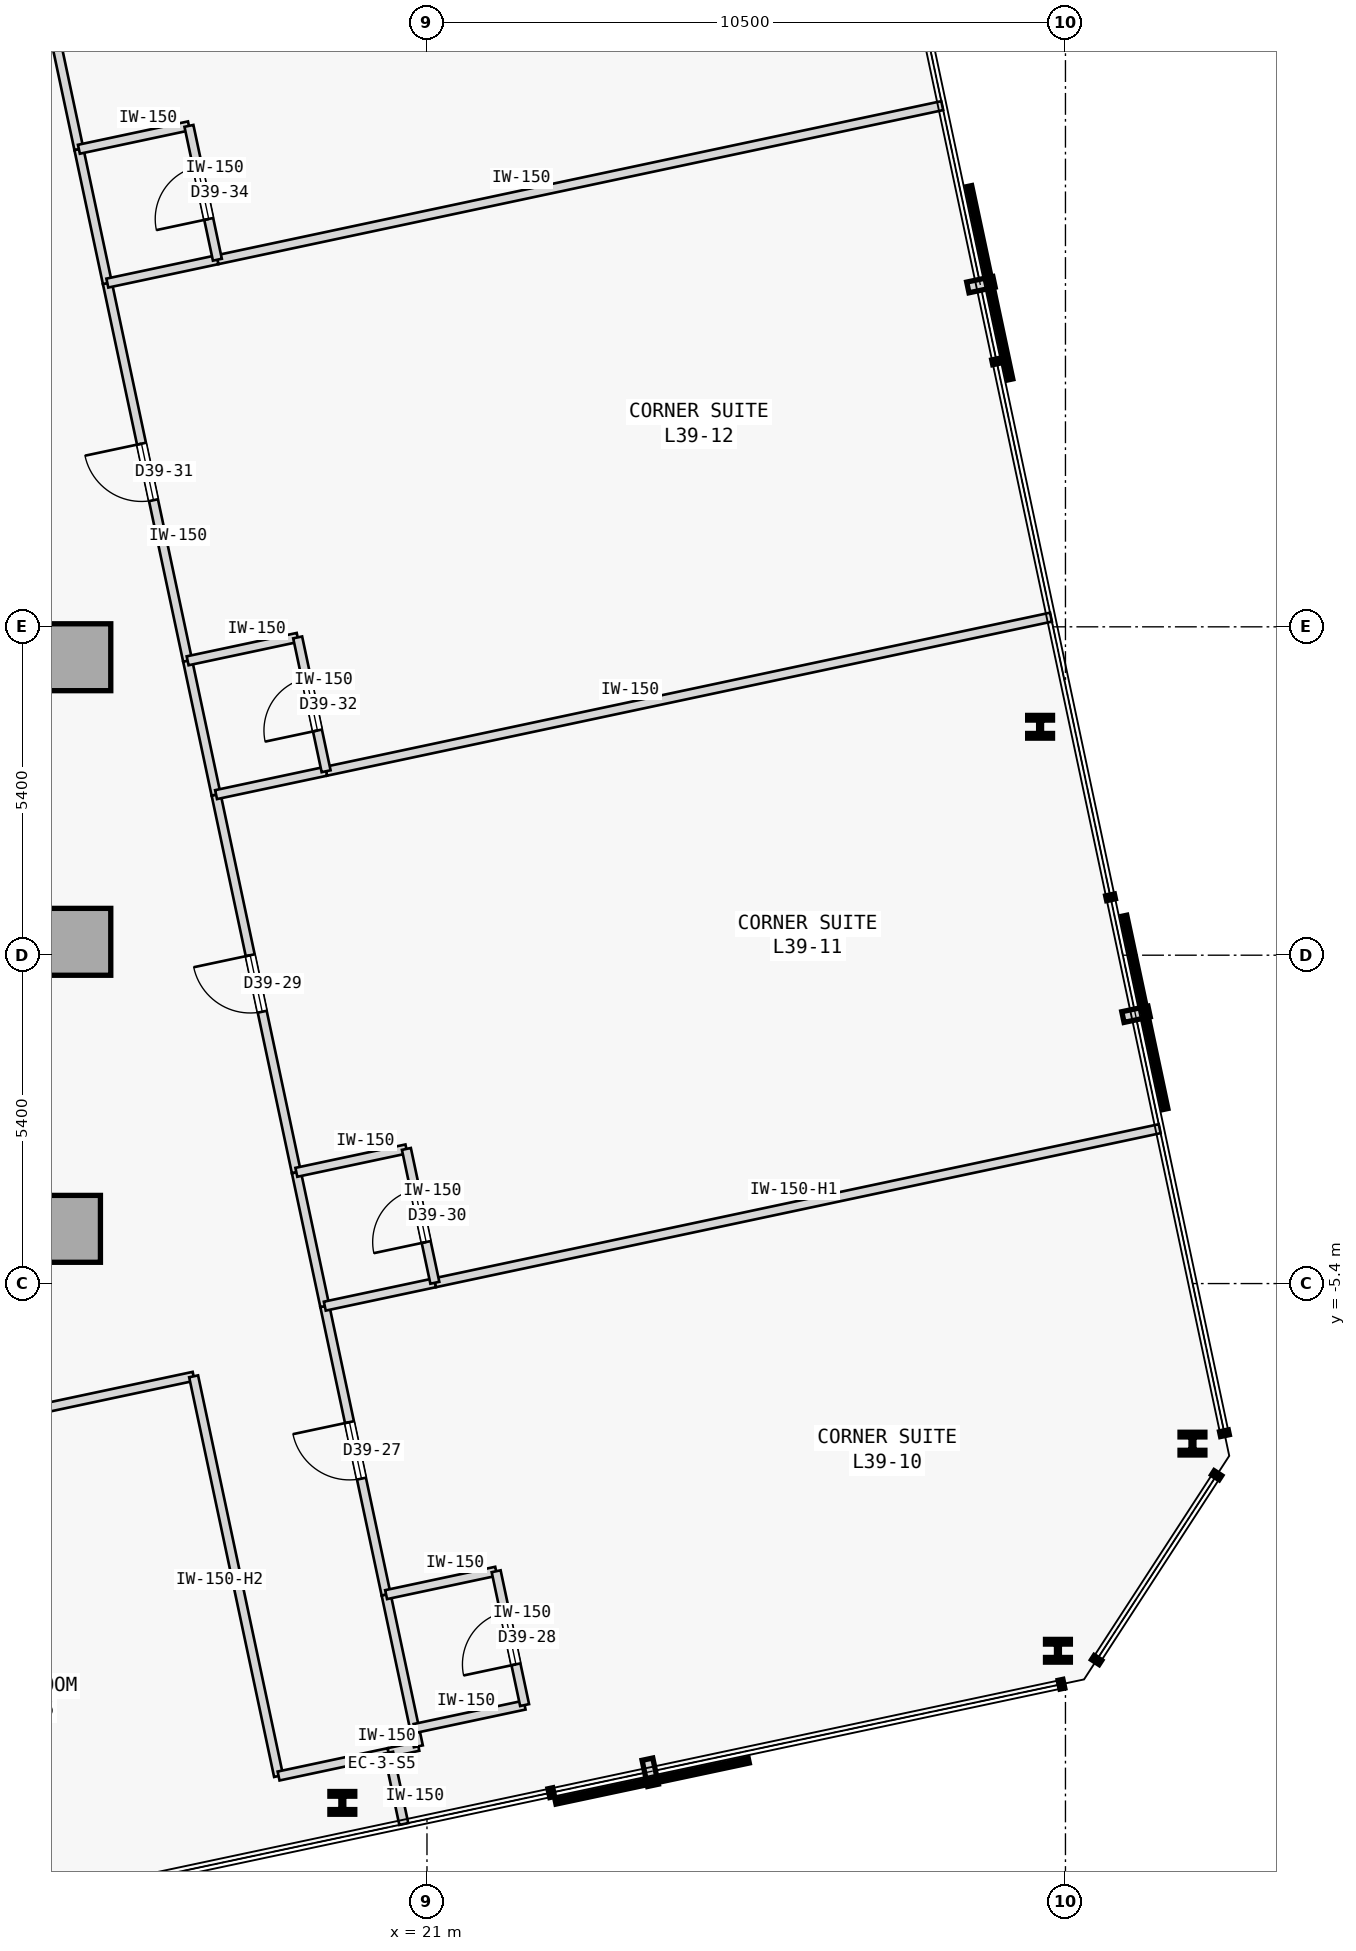
"""IFC4 building model, lengths in metres.
Left out: names, types, materials, properties, quantities, classifications, styles, units other than length and angle.
Written with IfcOpenShell. Run it as: python <this file> out.ifc"""

import sys

from ifc_helpers import new_model, si_unit, direction, frame, frame_2d, origin, origin_2d, place, context, subcontext, project, spatial, rectangle, i_section, extrude, element, fill, save


model = new_model("IFC4")
c1 = context("Model", 3, precision=1e-05, world=origin(), true_north=direction((0.0, 1.0)))
c2 = subcontext(c1, "Body", "Model", "MODEL_VIEW")
j1 = project(units=[si_unit("LENGTHUNIT", "METRE"), si_unit("PLANEANGLEUNIT", "RADIAN")], contexts=[c1])
p1 = place(None, origin())
s1 = spatial("IfcSite", under=j1, at=p1, CompositionType="ELEMENT")
p2 = place(p1, origin())
s2 = spatial("IfcBuilding", under=s1, at=p2, CompositionType="ELEMENT")
p3 = place(p2, frame((0.0, 0.0, 154.8)))
s3 = spatial("IfcBuildingStorey", under=s2, at=p3, CompositionType="ELEMENT", Elevation=154.8)
for number, where, z_axis, x_axis in (
    (1, (15.25, 4.9, 0.0), (0.0, 0.0, 1.0), (1.0, 0.0, 0.0)),
    (2, (15.25, 0.22, 0.0), (0.0, 0.0, 1.0), (1.0, 0.0, 0.0)),
    (3, (15.08, -4.5, 0.0), (0.0, 0.0, 1.0), (1.0, 0.0, 0.0)),
):
    element("IfcColumn", number, at=place(p3, frame(where, z_axis=z_axis, x_axis=x_axis)), inside=s3, PredefinedType="COLUMN", context=c2, shape_type="SweptSolid", body=[
        extrude(rectangle(XDim=1.1, YDim=1.1, at=origin_2d()), origin(), (0.0, 0.0, 1.0), 3.4),
    ])
for number, where, z_axis, x_axis in (
    (4, (19.608, -13.94, 0.0), (0.0, 0.0, 1.0), (1.0, 0.0, 0.0)),
    (5, (31.376, -11.439, 0.0), (0.0, 0.0, 1.0), (1.0, 0.0, 0.0)),
    (6, (33.589, -8.032, 0.0), (0.0, 0.0, 1.0), (1.0, 0.0, 0.0)),
    (7, (31.083, 3.756, 0.0), (0.0, 0.0, 1.0), (1.0, 0.0, 0.0)),
):
    element("IfcColumn", number, at=place(p3, frame(where, z_axis=z_axis, x_axis=x_axis)), inside=s3, PredefinedType="COLUMN", context=c2, shape_type="SweptSolid", body=[
        extrude(i_section(OverallWidth=0.409, OverallDepth=0.374, WebThickness=0.048, FlangeThickness=0.077, FilletRadius=0.015, at=origin_2d()), origin(), (0.0, 0.0, 1.0), 3.4),
    ])
p4 = place(p3, frame((10.309, -8.382, 0.0), z_axis=(0.0, 0.0, 1.0), x_axis=(0.978149817889, 0.207901259648, 0.0)))
e8 = element("IfcWall", 8, at=p4, inside=s3, PredefinedType="PARTITIONING", context=c2, shape_type="SweptSolid", body=[
    extrude(rectangle(XDim=7.007, YDim=0.15, at=frame_2d((3.503, 0.0))), origin(), (0.0, 0.0, 1.0), 3.175),
])
p5 = place(p4, frame((3.043, 0.0, 0.0)))
e9 = element("IfcOpeningElement", 9, at=p5, cuts=e8, PredefinedType="OPENING", context=c2, shape_type="SweptSolid", body=[
    extrude(rectangle(XDim=0.92, YDim=2.15, at=frame_2d((0.46, 1.075))), frame((0.0, 0.085, 0.0), z_axis=(0.0, -1.0, 0.0), x_axis=(1.0, 0.0, 0.0)), (0.0, 0.0, 1.0), 0.17),
])
p6 = place(p3, frame((18.56, -13.498, 0.0), z_axis=(0.0, 0.0, 1.0), x_axis=(-0.207888737749, 0.978152479278, 0.0)))
e10 = element("IfcWall", 10, at=p6, inside=s3, PredefinedType="PARTITIONING", context=c2, shape_type="SweptSolid", body=[
    extrude(rectangle(XDim=6.72, YDim=0.15, at=frame_2d((3.36, 0.0))), origin(), (0.0, 0.0, 1.0), 2.575),
])
p7 = place(p3, frame((18.56, -13.498, 0.0), z_axis=(0.0, 0.0, 1.0), x_axis=(0.978160192495, 0.207852442415, 0.0)))
e11 = element("IfcWall", 11, at=p7, inside=s3, PredefinedType="PARTITIONING", context=c2, shape_type="SweptSolid", body=[
    extrude(rectangle(XDim=1.85, YDim=0.15, at=frame_2d((0.925, 0.0))), origin(), (0.0, 0.0, 1.0), 3.175),
])
p8 = place(p3, frame((20.369, -13.114, 0.0), z_axis=(0.0, 0.0, 1.0), x_axis=(0.978143962546, 0.207928806409, 0.0)))
e12 = element("IfcWall", 12, at=p8, inside=s3, PredefinedType="PARTITIONING", context=c2, shape_type="SweptSolid", body=[
    extrude(rectangle(XDim=0.5, YDim=0.15, at=frame_2d((0.25, 0.0))), origin(), (0.0, 0.0, 1.0), 3.175),
])
p9 = place(p3, frame((20.858, -13.01, 0.0), z_axis=(0.0, 0.0, 1.0), x_axis=(-0.208306395052, 0.978063620518, 0.0)))
e13 = element("IfcWall", 13, at=p9, inside=s3, PredefinedType="PARTITIONING", context=c2, shape_type="SweptSolid", body=[
    extrude(rectangle(XDim=0.3, YDim=0.15, at=frame_2d((0.15, 0.0))), origin(), (0.0, 0.0, 1.0), 3.175),
])
p10 = place(p3, frame((20.328, -10.515, 0.0), z_axis=(0.0, 0.0, 1.0), x_axis=(-0.207950868925, 0.97813927235, 0.0)))
e14 = element("IfcWall", 14, at=p10, inside=s3, PredefinedType="PARTITIONING", context=c2, shape_type="SweptSolid", body=[
    extrude(rectangle(XDim=4.85, YDim=0.15, at=frame_2d((2.425, 0.0))), origin(), (0.0, 0.0, 1.0), 3.175),
])
p11 = place(p10, frame((1.95, 0.0, 0.0)))
e15 = element("IfcOpeningElement", 15, at=p11, cuts=e14, PredefinedType="OPENING", context=c2, shape_type="SweptSolid", body=[
    extrude(rectangle(XDim=0.95, YDim=2.15, at=frame_2d((0.475, 1.075))), frame((0.0, 0.085, 0.0), z_axis=(0.0, -1.0, 0.0), x_axis=(1.0, 0.0, 0.0)), (0.0, 0.0, 1.0), 0.17),
])
p12 = place(p3, frame((20.796, -12.716, 0.0), z_axis=(0.0, 0.0, 1.0), x_axis=(-0.207891197838, 0.978151956427, 0.0)))
e16 = element("IfcWall", 16, at=p12, inside=s3, PredefinedType="PARTITIONING", context=c2, shape_type="SweptSolid", body=[
    extrude(rectangle(XDim=2.25, YDim=0.15, at=frame_2d((1.125, 0.0))), origin(), (0.0, 0.0, 1.0), 3.175),
])
p13 = place(p3, frame((18.852, -3.571, 0.0), z_axis=(0.0, 0.0, 1.0), x_axis=(-0.207879907349, 0.978154355979, 0.0)))
e17 = element("IfcWall", 17, at=p13, inside=s3, PredefinedType="PARTITIONING", context=c2, shape_type="SweptSolid", body=[
    extrude(rectangle(XDim=6.35, YDim=0.15, at=frame_2d((3.175, 0.0))), origin(), (0.0, 0.0, 1.0), 3.175),
])
p14 = place(p13, frame((2.7, 0.0, 0.0)))
e18 = element("IfcOpeningElement", 18, at=p14, cuts=e17, PredefinedType="OPENING", context=c2, shape_type="SweptSolid", body=[
    extrude(rectangle(XDim=0.95, YDim=2.15, at=frame_2d((0.475, 1.075))), frame((0.0, 0.085, 0.0), z_axis=(0.0, -1.0, 0.0), x_axis=(1.0, 0.0, 0.0)), (0.0, 0.0, 1.0), 0.17),
])
p15 = place(p3, frame((19.32, -5.771, 0.0), z_axis=(0.0, 0.0, 1.0), x_axis=(-0.207913264065, 0.978147266328, 0.0)))
e19 = element("IfcWall", 19, at=p15, inside=s3, PredefinedType="PARTITIONING", context=c2, shape_type="SweptSolid", body=[
    extrude(rectangle(XDim=2.25, YDim=0.15, at=frame_2d((1.125, 0.0))), origin(), (0.0, 0.0, 1.0), 3.175),
])
p16 = place(p3, frame((17.064, 4.841, 0.0), z_axis=(0.0, 0.0, 1.0), x_axis=(-0.207924511115, 0.978144875608, 0.0)))
e20 = element("IfcWall", 20, at=p16, inside=s3, PredefinedType="PARTITIONING", context=c2, shape_type="SweptSolid", body=[
    extrude(rectangle(XDim=6.35, YDim=0.15, at=frame_2d((3.175, 0.0))), origin(), (0.0, 0.0, 1.0), 3.175),
])
p17 = place(p16, frame((2.7, 0.0, 0.0)))
e21 = element("IfcOpeningElement", 21, at=p17, cuts=e20, PredefinedType="OPENING", context=c2, shape_type="SweptSolid", body=[
    extrude(rectangle(XDim=0.95, YDim=2.15, at=frame_2d((0.475, 1.075))), frame((0.0, 0.085, 0.0), z_axis=(0.0, -1.0, 0.0), x_axis=(1.0, 0.0, 0.0)), (0.0, 0.0, 1.0), 0.17),
])
p18 = place(p3, frame((17.532, 2.641, 0.0), z_axis=(0.0, 0.0, 1.0), x_axis=(-0.207913264065, 0.978147266328, 0.0)))
e22 = element("IfcWall", 22, at=p18, inside=s3, PredefinedType="PARTITIONING", context=c2, shape_type="SweptSolid", body=[
    extrude(rectangle(XDim=2.25, YDim=0.15, at=frame_2d((1.125, 0.0))), origin(), (0.0, 0.0, 1.0), 3.175),
])
p19 = place(p3, frame((15.276, 13.253, 0.0), z_axis=(0.0, 0.0, 1.0), x_axis=(-0.207924511115, 0.978144875608, 0.0)))
e23 = element("IfcWall", 23, at=p19, inside=s3, PredefinedType="PARTITIONING", context=c2, shape_type="SweptSolid", body=[
    extrude(rectangle(XDim=6.35, YDim=0.15, at=frame_2d((3.175, 0.0))), origin(), (0.0, 0.0, 1.0), 3.175),
])
p20 = place(p19, frame((2.7, 0.0, 0.0)))
e24 = element("IfcOpeningElement", 24, at=p20, cuts=e23, PredefinedType="OPENING", context=c2, shape_type="SweptSolid", body=[
    extrude(rectangle(XDim=0.95, YDim=2.15, at=frame_2d((0.475, 1.075))), frame((0.0, 0.085, 0.0), z_axis=(0.0, -1.0, 0.0), x_axis=(1.0, 0.0, 0.0)), (0.0, 0.0, 1.0), 0.17),
])
p21 = place(p3, frame((15.744, 11.052, 0.0), z_axis=(0.0, 0.0, 1.0), x_axis=(-0.207891197838, 0.978151956427, 0.0)))
e25 = element("IfcWall", 25, at=p21, inside=s3, PredefinedType="PARTITIONING", context=c2, shape_type="SweptSolid", body=[
    extrude(rectangle(XDim=2.25, YDim=0.15, at=frame_2d((1.125, 0.0))), origin(), (0.0, 0.0, 1.0), 3.175),
])
p22 = place(p3, frame((20.619, -14.288, 0.0), z_axis=(0.0, 0.0, 1.0), x_axis=(-0.207917150959, 0.978146440129, 0.0)))
e26 = element("IfcWall", 26, at=p22, inside=s3, PredefinedType="PARTITIONING", context=c2, shape_type="SweptSolid", body=[
    extrude(rectangle(XDim=1.2, YDim=0.15, at=frame_2d((0.6, 0.0))), origin(), (0.0, 0.0, 1.0), 3.175),
])
for number, where, z_axis, x_axis in (
    (27, (20.796, -12.716, 0.0), (0.0, 0.0, 1.0), (0.978, 0.208, 0.0)),
    (28, (20.328, -10.515, 0.0), (0.0, 0.0, 1.0), (0.978, 0.208, 0.0)),
):
    element("IfcWall", number, at=place(p3, frame(where, z_axis=z_axis, x_axis=x_axis)), inside=s3, PredefinedType="PARTITIONING", context=c2, shape_type="SweptSolid", body=[
        extrude(rectangle(XDim=1.85, YDim=0.15, at=frame_2d((0.925, 0.0))), origin(), (0.0, 0.0, 1.0), 3.175),
    ])
p23 = place(p3, frame((22.605, -12.332, 0.0), z_axis=(0.0, 0.0, 1.0), x_axis=(-0.207891197838, 0.978151956427, 0.0)))
e29 = element("IfcWall", 29, at=p23, inside=s3, PredefinedType="PARTITIONING", context=c2, shape_type="SweptSolid", body=[
    extrude(rectangle(XDim=2.25, YDim=0.15, at=frame_2d((1.125, 0.0))), origin(), (0.0, 0.0, 1.0), 3.175),
])
p24 = place(p23, frame((0.685, 0.0, 0.0)))
e30 = element("IfcOpeningElement", 30, at=p24, cuts=e29, PredefinedType="OPENING", context=c2, shape_type="SweptSolid", body=[
    extrude(rectangle(XDim=0.88, YDim=2.15, at=frame_2d((0.44, 1.075))), frame((0.0, 0.085, 0.0), z_axis=(0.0, -1.0, 0.0), x_axis=(1.0, 0.0, 0.0)), (0.0, 0.0, 1.0), 0.17),
])
p25 = place(p3, frame((21.129, -5.387, 0.0), z_axis=(0.0, 0.0, 1.0), x_axis=(0.97814556055, 0.207921288896, 0.0)))
e31 = element("IfcWall", 31, at=p25, inside=s3, PredefinedType="PARTITIONING", context=c2, shape_type="SweptSolid", body=[
    extrude(rectangle(XDim=12.187, YDim=0.15, at=frame_2d((6.094, 0.0))), origin(), (0.0, 0.0, 1.0), 2.725),
])
p26 = place(p3, frame((19.32, -5.771, 0.0), z_axis=(0.0, 0.0, 1.0), x_axis=(0.978165892835, 0.207825614625, 0.0)))
e32 = element("IfcWall", 32, at=p26, inside=s3, PredefinedType="PARTITIONING", context=c2, shape_type="SweptSolid", body=[
    extrude(rectangle(XDim=1.85, YDim=0.15, at=frame_2d((0.925, 0.0))), origin(), (0.0, 0.0, 1.0), 3.175),
])
p27 = place(p3, frame((18.852, -3.571, 0.0), z_axis=(0.0, 0.0, 1.0), x_axis=(0.978139061018, 0.207951862966, 0.0)))
e33 = element("IfcWall", 33, at=p27, inside=s3, PredefinedType="PARTITIONING", context=c2, shape_type="SweptSolid", body=[
    extrude(rectangle(XDim=1.85, YDim=0.15, at=frame_2d((0.925, 0.0))), origin(), (0.0, 0.0, 1.0), 3.175),
])
p28 = place(p3, frame((21.129, -5.387, 0.0), z_axis=(0.0, 0.0, 1.0), x_axis=(-0.207891197838, 0.978151956427, 0.0)))
e34 = element("IfcWall", 34, at=p28, inside=s3, PredefinedType="PARTITIONING", context=c2, shape_type="SweptSolid", body=[
    extrude(rectangle(XDim=2.25, YDim=0.15, at=frame_2d((1.125, 0.0))), origin(), (0.0, 0.0, 1.0), 3.175),
])
p29 = place(p28, frame((0.685, 0.0, 0.0)))
e35 = element("IfcOpeningElement", 35, at=p29, cuts=e34, PredefinedType="OPENING", context=c2, shape_type="SweptSolid", body=[
    extrude(rectangle(XDim=0.88, YDim=2.15, at=frame_2d((0.44, 1.075))), frame((0.0, 0.085, 0.0), z_axis=(0.0, -1.0, 0.0), x_axis=(1.0, 0.0, 0.0)), (0.0, 0.0, 1.0), 0.17),
])
p30 = place(p3, frame((19.341, 3.025, 0.0), z_axis=(0.0, 0.0, 1.0), x_axis=(0.97814556055, 0.207921288896, 0.0)))
e36 = element("IfcWall", 36, at=p30, inside=s3, PredefinedType="PARTITIONING", context=c2, shape_type="SweptSolid", body=[
    extrude(rectangle(XDim=12.187, YDim=0.15, at=frame_2d((6.094, 0.0))), origin(), (0.0, 0.0, 1.0), 3.175),
])
p31 = place(p3, frame((17.532, 2.641, 0.0), z_axis=(0.0, 0.0, 1.0), x_axis=(0.978160192495, 0.207852442415, 0.0)))
e37 = element("IfcWall", 37, at=p31, inside=s3, PredefinedType="PARTITIONING", context=c2, shape_type="SweptSolid", body=[
    extrude(rectangle(XDim=1.85, YDim=0.15, at=frame_2d((0.925, 0.0))), origin(), (0.0, 0.0, 1.0), 3.175),
])
p32 = place(p3, frame((17.064, 4.841, 0.0), z_axis=(0.0, 0.0, 1.0), x_axis=(0.978133353907, 0.20797870558, 0.0)))
e38 = element("IfcWall", 38, at=p32, inside=s3, PredefinedType="PARTITIONING", context=c2, shape_type="SweptSolid", body=[
    extrude(rectangle(XDim=1.85, YDim=0.15, at=frame_2d((0.925, 0.0))), origin(), (0.0, 0.0, 1.0), 3.175),
])
p33 = place(p3, frame((19.341, 3.025, 0.0), z_axis=(0.0, 0.0, 1.0), x_axis=(-0.207891197838, 0.978151956427, 0.0)))
e39 = element("IfcWall", 39, at=p33, inside=s3, PredefinedType="PARTITIONING", context=c2, shape_type="SweptSolid", body=[
    extrude(rectangle(XDim=2.25, YDim=0.15, at=frame_2d((1.125, 0.0))), origin(), (0.0, 0.0, 1.0), 3.175),
])
p34 = place(p33, frame((0.685, 0.0, 0.0)))
e40 = element("IfcOpeningElement", 40, at=p34, cuts=e39, PredefinedType="OPENING", context=c2, shape_type="SweptSolid", body=[
    extrude(rectangle(XDim=0.88, YDim=2.15, at=frame_2d((0.44, 1.075))), frame((0.0, 0.085, 0.0), z_axis=(0.0, -1.0, 0.0), x_axis=(1.0, 0.0, 0.0)), (0.0, 0.0, 1.0), 0.17),
])
p35 = place(p3, frame((17.553, 11.437, 0.0), z_axis=(0.0, 0.0, 1.0), x_axis=(0.97814556055, 0.207921288896, 0.0)))
e41 = element("IfcWall", 41, at=p35, inside=s3, PredefinedType="PARTITIONING", context=c2, shape_type="SweptSolid", body=[
    extrude(rectangle(XDim=12.187, YDim=0.15, at=frame_2d((6.094, 0.0))), origin(), (0.0, 0.0, 1.0), 3.175),
])
for number, where, z_axis, x_axis in (
    (42, (15.744, 11.052, 0.0), (0.0, 0.0, 1.0), (0.978, 0.208, 0.0)),
    (43, (15.276, 13.253, 0.0), (0.0, 0.0, 1.0), (0.978, 0.208, 0.0)),
):
    element("IfcWall", number, at=place(p3, frame(where, z_axis=z_axis, x_axis=x_axis)), inside=s3, PredefinedType="PARTITIONING", context=c2, shape_type="SweptSolid", body=[
        extrude(rectangle(XDim=1.85, YDim=0.15, at=frame_2d((0.925, 0.0))), origin(), (0.0, 0.0, 1.0), 3.175),
    ])
p36 = place(p3, frame((17.553, 11.437, 0.0), z_axis=(0.0, 0.0, 1.0), x_axis=(-0.207891197838, 0.978151956427, 0.0)))
e44 = element("IfcWall", 44, at=p36, inside=s3, PredefinedType="PARTITIONING", context=c2, shape_type="SweptSolid", body=[
    extrude(rectangle(XDim=2.25, YDim=0.15, at=frame_2d((1.125, 0.0))), origin(), (0.0, 0.0, 1.0), 3.175),
])
p37 = place(p36, frame((0.685, 0.0, 0.0)))
e45 = element("IfcOpeningElement", 45, at=p37, cuts=e44, PredefinedType="OPENING", context=c2, shape_type="SweptSolid", body=[
    extrude(rectangle(XDim=0.88, YDim=2.15, at=frame_2d((0.44, 1.075))), frame((0.0, 0.085, 0.0), z_axis=(0.0, -1.0, 0.0), x_axis=(1.0, 0.0, 0.0)), (0.0, 0.0, 1.0), 0.17),
])
p38 = place(p11, origin())
e46 = element("IfcDoor", 46, at=p38, inside=s3, OperationType="SINGLE_SWING_RIGHT", PredefinedType="DOOR", context=c2, shape_type="SweptSolid", body=[
    extrude(rectangle(XDim=0.95, YDim=2.15, at=frame_2d((0.475, 1.075))), frame((0.0, 0.025, 0.0), z_axis=(0.0, -1.0, 0.0), x_axis=(1.0, 0.0, 0.0)), (0.0, 0.0, 1.0), 0.05),
])
fill(e15, e46)
p39 = place(p24, origin())
e47 = element("IfcDoor", 47, at=p39, inside=s3, OperationType="SINGLE_SWING_LEFT", PredefinedType="DOOR", context=c2, shape_type="SweptSolid", body=[
    extrude(rectangle(XDim=0.88, YDim=2.15, at=frame_2d((0.44, 1.075))), frame((0.0, 0.025, 0.0), z_axis=(0.0, -1.0, 0.0), x_axis=(1.0, 0.0, 0.0)), (0.0, 0.0, 1.0), 0.05),
])
fill(e30, e47)
p40 = place(p14, origin())
e48 = element("IfcDoor", 48, at=p40, inside=s3, OperationType="SINGLE_SWING_RIGHT", PredefinedType="DOOR", context=c2, shape_type="SweptSolid", body=[
    extrude(rectangle(XDim=0.95, YDim=2.15, at=frame_2d((0.475, 1.075))), frame((0.0, 0.025, 0.0), z_axis=(0.0, -1.0, 0.0), x_axis=(1.0, 0.0, 0.0)), (0.0, 0.0, 1.0), 0.05),
])
fill(e18, e48)
p41 = place(p29, origin())
e49 = element("IfcDoor", 49, at=p41, inside=s3, OperationType="SINGLE_SWING_LEFT", PredefinedType="DOOR", context=c2, shape_type="SweptSolid", body=[
    extrude(rectangle(XDim=0.88, YDim=2.15, at=frame_2d((0.44, 1.075))), frame((0.0, 0.025, 0.0), z_axis=(0.0, -1.0, 0.0), x_axis=(1.0, 0.0, 0.0)), (0.0, 0.0, 1.0), 0.05),
])
fill(e35, e49)
p42 = place(p17, origin())
e50 = element("IfcDoor", 50, at=p42, inside=s3, OperationType="SINGLE_SWING_RIGHT", PredefinedType="DOOR", context=c2, shape_type="SweptSolid", body=[
    extrude(rectangle(XDim=0.95, YDim=2.15, at=frame_2d((0.475, 1.075))), frame((0.0, 0.025, 0.0), z_axis=(0.0, -1.0, 0.0), x_axis=(1.0, 0.0, 0.0)), (0.0, 0.0, 1.0), 0.05),
])
fill(e21, e50)
p43 = place(p34, origin())
e51 = element("IfcDoor", 51, at=p43, inside=s3, OperationType="SINGLE_SWING_LEFT", PredefinedType="DOOR", context=c2, shape_type="SweptSolid", body=[
    extrude(rectangle(XDim=0.88, YDim=2.15, at=frame_2d((0.44, 1.075))), frame((0.0, 0.025, 0.0), z_axis=(0.0, -1.0, 0.0), x_axis=(1.0, 0.0, 0.0)), (0.0, 0.0, 1.0), 0.05),
])
fill(e40, e51)
p44 = place(p37, origin())
e52 = element("IfcDoor", 52, at=p44, inside=s3, OperationType="SINGLE_SWING_LEFT", PredefinedType="DOOR", context=c2, shape_type="SweptSolid", body=[
    extrude(rectangle(XDim=0.88, YDim=2.15, at=frame_2d((0.44, 1.075))), frame((0.0, 0.025, 0.0), z_axis=(0.0, -1.0, 0.0), x_axis=(1.0, 0.0, 0.0)), (0.0, 0.0, 1.0), 0.05),
])
fill(e45, e52)
save(model, sys.argv[1])
